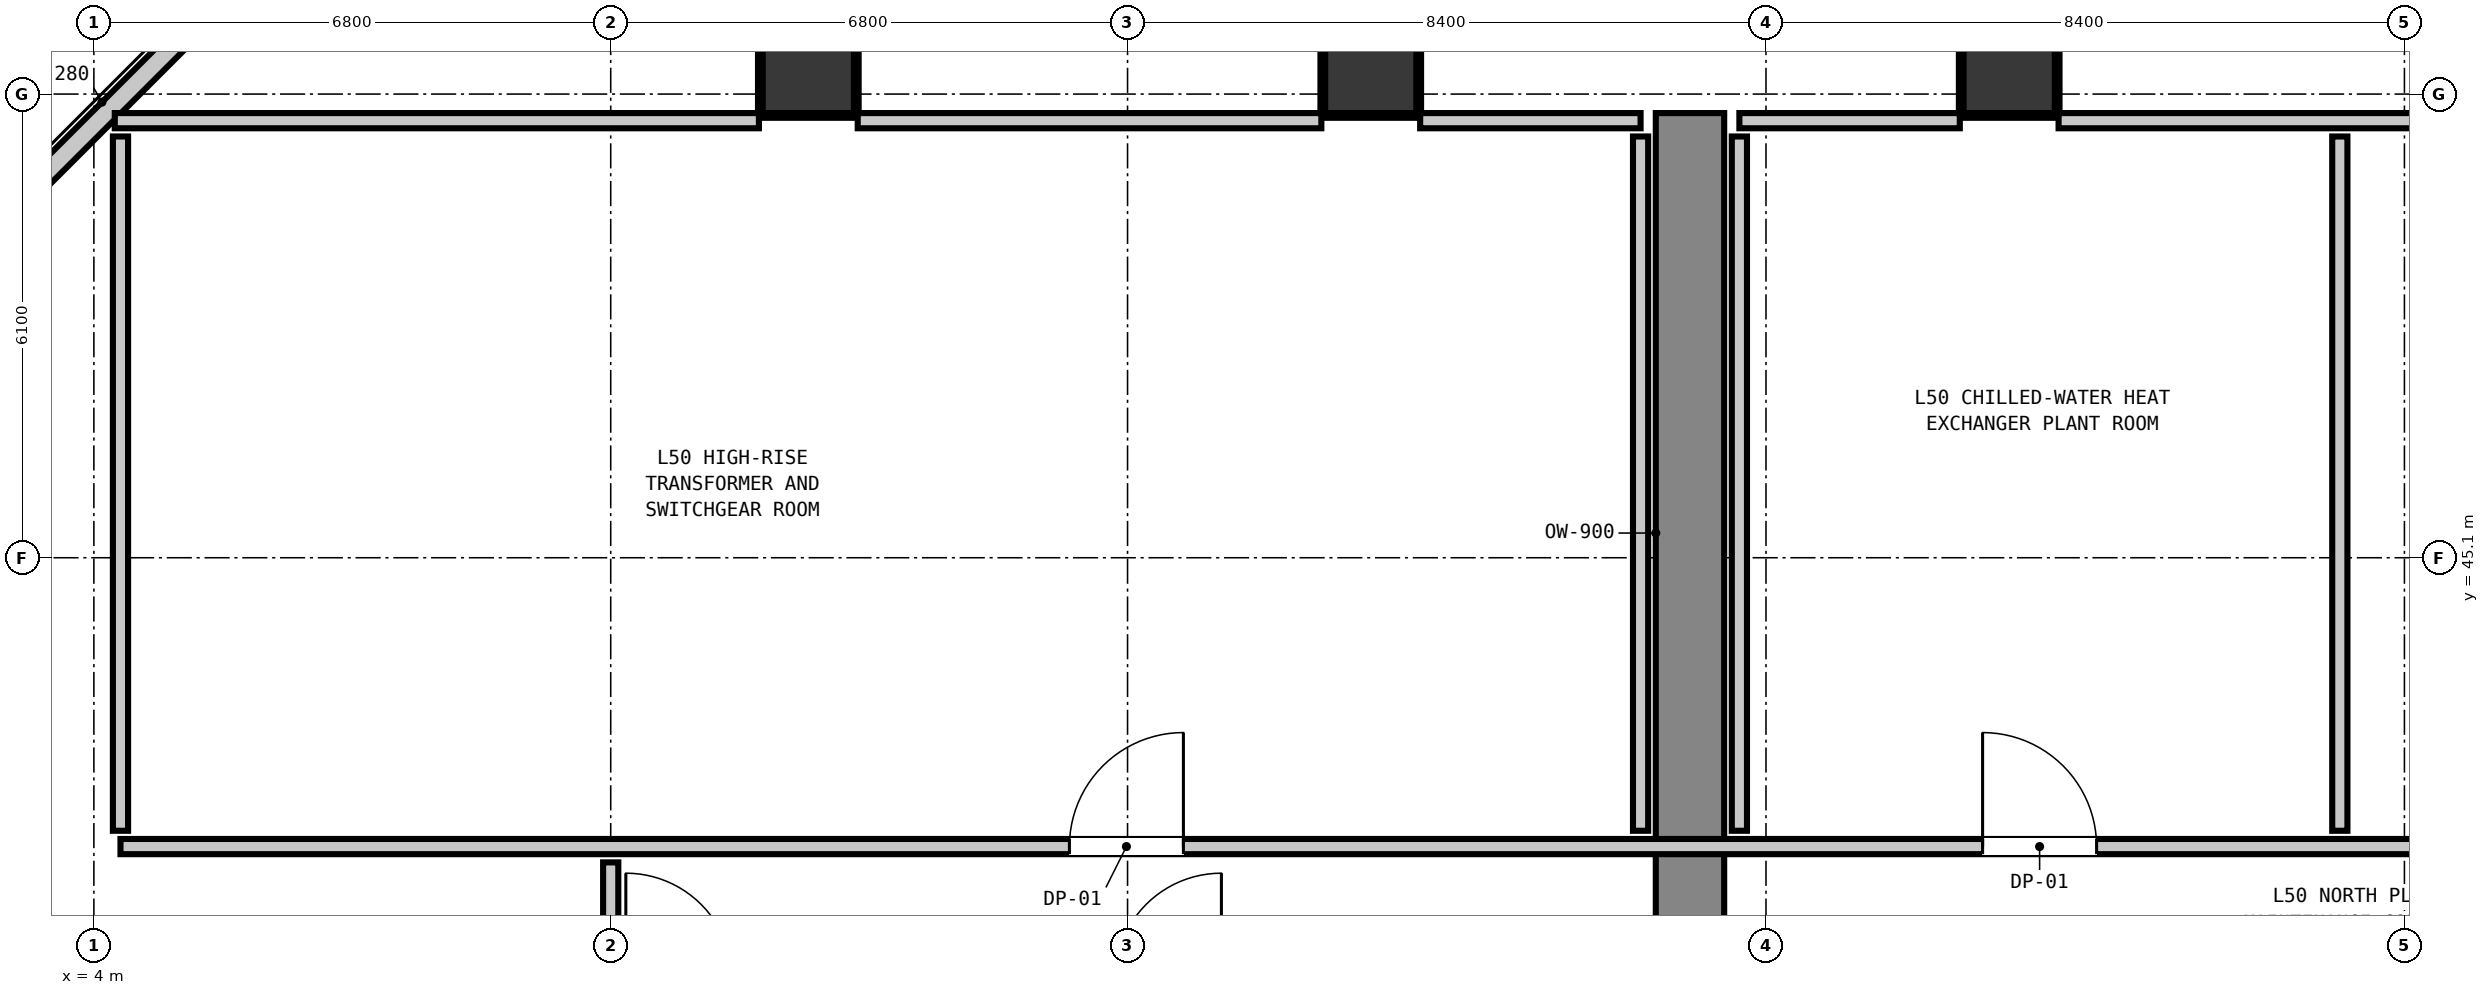
"""IFC4 building model, lengths in metres.
Left out: names, types, materials, properties, quantities, classifications, styles, units other than length and angle.
Written with IfcOpenShell. Run it as: python <this file> out.ifc"""

import sys

from ifc_helpers import new_model, si_unit, direction, frame, frame_2d, origin, origin_2d, place, context, subcontext, project, spatial, rectangle, extrude, element, fill, save


model = new_model("IFC4")
c1 = context("Model", 3, precision=1e-05, world=origin(), true_north=direction((0.0, 1.0)))
c2 = subcontext(c1, "Body", "Model", "MODEL_VIEW")
j1 = project(units=[si_unit("LENGTHUNIT", "METRE"), si_unit("PLANEANGLEUNIT", "RADIAN")], contexts=[c1])
p1 = place(None, origin())
s1 = spatial("IfcSite", under=j1, at=p1, CompositionType="ELEMENT")
p2 = place(p1, origin())
s2 = spatial("IfcBuilding", under=s1, at=p2, CompositionType="ELEMENT")
p3 = place(p2, frame((0.0, 0.0, 172.48)))
s3 = spatial("IfcBuildingStorey", under=s2, at=p3, CompositionType="ELEMENT", Elevation=172.48)
for number, where, z_axis, x_axis in (
    (1, (13.4, 51.55, 0.0), (0.0, 0.0, 1.0), (1.0, 0.0, 0.0)),
    (2, (20.8, 51.55, 0.0), (0.0, 0.0, 1.0), (1.0, 0.0, 0.0)),
    (3, (29.2, 51.55, 0.0), (0.0, 0.0, 1.0), (1.0, 0.0, 0.0)),
):
    element("IfcColumn", number, at=place(p3, frame(where, z_axis=z_axis, x_axis=x_axis)), inside=s3, PredefinedType="COLUMN", context=c2, shape_type="SweptSolid", body=[
        extrude(rectangle(XDim=1.2, YDim=1.2, at=origin_2d()), origin(), (0.0, 0.0, 1.0), 4.4),
    ])
p4 = place(p3, frame((25.0, 39.9, 0.0), z_axis=(0.0, 0.0, 1.0), x_axis=(0.0, 1.0, 0.0)))
e4 = element("IfcWall", 4, at=p4, inside=s3, PredefinedType="SHEAR", context=c2, shape_type="SweptSolid", body=[
    extrude(rectangle(XDim=11.05, YDim=0.9, at=frame_2d((5.525, 0.0))), origin(), (0.0, 0.0, 1.0), 4.16),
])
p5 = place(p3, frame((3.055, 49.845, 0.0), z_axis=(0.0, 0.0, 1.0), x_axis=(0.707106781187, 0.707106781187, 0.0)))
e5 = element("IfcWall", 5, at=p5, inside=s3, PredefinedType="STANDARD", context=c2, shape_type="SweptSolid", body=[
    extrude(rectangle(XDim=3.253, YDim=0.28, at=frame_2d((1.626, 0.0))), origin(), (0.0, 0.0, 1.0), 4.16),
])
p6 = place(p3, frame((4.35, 41.3, 0.0), z_axis=(0.0, 0.0, 1.0), x_axis=(1.0, 0.0, 0.0)))
e6 = element("IfcWall", 6, at=p6, inside=s3, PredefinedType="PARTITIONING", context=c2, shape_type="SweptSolid", body=[
    extrude(rectangle(XDim=37.1, YDim=0.2, at=frame_2d((18.55, 0.0))), origin(), (0.0, 0.0, 1.0), 4.16),
])
p7 = place(p6, frame((24.5, 0.0, 0.0)))
e7 = element("IfcOpeningElement", 7, at=p7, cuts=e6, PredefinedType="OPENING", context=c2, shape_type="SweptSolid", body=[
    extrude(rectangle(XDim=1.5, YDim=2.15, at=frame_2d((0.75, 1.075))), frame((0.0, 0.11, 0.0), z_axis=(0.0, -1.0, 0.0), x_axis=(1.0, 0.0, 0.0)), (0.0, 0.0, 1.0), 0.22),
])
p8 = place(p6, frame((31.215, 0.0, 0.0)))
e8 = element("IfcOpeningElement", 8, at=p8, cuts=e6, PredefinedType="OPENING", context=c2, shape_type="SweptSolid", body=[
    extrude(rectangle(XDim=1.5, YDim=2.15, at=frame_2d((0.75, 1.075))), frame((0.0, 0.11, 0.0), z_axis=(0.0, -1.0, 0.0), x_axis=(1.0, 0.0, 0.0)), (0.0, 0.0, 1.0), 0.22),
])
p9 = place(p6, frame((12.485, 0.0, 0.0)))
e9 = element("IfcOpeningElement", 9, at=p9, cuts=e6, PredefinedType="OPENING", context=c2, shape_type="SweptSolid", body=[
    extrude(rectangle(XDim=1.5, YDim=2.15, at=frame_2d((0.75, 1.075))), frame((0.0, 0.11, 0.0), z_axis=(0.0, -1.0, 0.0), x_axis=(1.0, 0.0, 0.0)), (0.0, 0.0, 1.0), 0.22),
])
p10 = place(p3, frame((4.275, 50.85, 0.0), z_axis=(0.0, 0.0, 1.0), x_axis=(1.0, 0.0, 0.0)))
e10 = element("IfcWall", 10, at=p10, inside=s3, PredefinedType="PARTITIONING", context=c2, shape_type="SweptSolid", body=[
    extrude(rectangle(XDim=8.475, YDim=0.2, at=frame_2d((4.238, 0.0))), origin(), (0.0, 0.0, 1.0), 4.16),
])
p11 = place(p3, frame((14.05, 50.85, 0.0), z_axis=(0.0, 0.0, 1.0), x_axis=(1.0, 0.0, 0.0)))
e11 = element("IfcWall", 11, at=p11, inside=s3, PredefinedType="PARTITIONING", context=c2, shape_type="SweptSolid", body=[
    extrude(rectangle(XDim=6.1, YDim=0.2, at=frame_2d((3.05, 0.0))), origin(), (0.0, 0.0, 1.0), 4.16),
])
for number, where, z_axis, x_axis in (
    (12, (21.45, 50.85, 0.0), (0.0, 0.0, 1.0), (1.0, 0.0, 0.0)),
    (13, (25.65, 50.85, 0.0), (0.0, 0.0, 1.0), (1.0, 0.0, 0.0)),
):
    element("IfcWall", number, at=place(p3, frame(where, z_axis=z_axis, x_axis=x_axis)), inside=s3, PredefinedType="PARTITIONING", context=c2, shape_type="SweptSolid", body=[
        extrude(rectangle(XDim=2.9, YDim=0.2, at=frame_2d((1.45, 0.0))), origin(), (0.0, 0.0, 1.0), 4.16),
    ])
p12 = place(p3, frame((29.85, 50.85, 0.0), z_axis=(0.0, 0.0, 1.0), x_axis=(1.0, 0.0, 0.0)))
e14 = element("IfcWall", 14, at=p12, inside=s3, PredefinedType="PARTITIONING", context=c2, shape_type="SweptSolid", body=[
    extrude(rectangle(XDim=6.0, YDim=0.2, at=frame_2d((3.0, 0.0))), origin(), (0.0, 0.0, 1.0), 4.16),
])
p13 = place(p3, frame((4.35, 41.508, 0.0), z_axis=(0.0, 0.0, 1.0), x_axis=(0.0, 1.0, 0.0)))
e15 = element("IfcWall", 15, at=p13, inside=s3, PredefinedType="PARTITIONING", context=c2, shape_type="SweptSolid", body=[
    extrude(rectangle(XDim=9.134, YDim=0.2, at=frame_2d((4.567, 0.0))), origin(), (0.0, 0.0, 1.0), 4.16),
])
p14 = place(p3, frame((10.8, 39.748, 0.0), z_axis=(0.0, 0.0, 1.0), x_axis=(0.0, 1.0, 0.0)))
e16 = element("IfcWall", 16, at=p14, inside=s3, PredefinedType="PARTITIONING", context=c2, shape_type="SweptSolid", body=[
    extrude(rectangle(XDim=1.344, YDim=0.2, at=frame_2d((0.672, 0.0))), origin(), (0.0, 0.0, 1.0), 4.16),
])
for number, where, z_axis, x_axis in (
    (17, (24.35, 41.508, 0.0), (0.0, 0.0, 1.0), (0.0, 1.0, 0.0)),
    (18, (25.65, 41.508, 0.0), (0.0, 0.0, 1.0), (0.0, 1.0, 0.0)),
    (19, (33.55, 41.508, 0.0), (0.0, 0.0, 1.0), (0.0, 1.0, 0.0)),
):
    element("IfcWall", number, at=place(p3, frame(where, z_axis=z_axis, x_axis=x_axis)), inside=s3, PredefinedType="PARTITIONING", context=c2, shape_type="SweptSolid", body=[
        extrude(rectangle(XDim=9.134, YDim=0.2, at=frame_2d((4.567, 0.0))), origin(), (0.0, 0.0, 1.0), 4.16),
    ])
p15 = place(p3, frame((12.8, 50.918, 0.0), z_axis=(0.0, 0.0, 1.0), x_axis=(1.0, 0.0, 0.0)))
e20 = element("IfcWall", 20, at=p15, inside=s3, PredefinedType="PARTITIONING", context=c2, shape_type="SweptSolid", body=[
    extrude(rectangle(XDim=1.2, YDim=0.06, at=frame_2d((0.6, 0.0))), origin(), (0.0, 0.0, 1.0), 1.45),
])
for number, where, z_axis, x_axis in (
    (21, (12.768, 50.95, 0.0), (0.0, 0.0, 1.0), (0.0, 1.0, 0.0)),
    (22, (14.032, 50.95, 0.0), (0.0, 0.0, 1.0), (0.0, 1.0, 0.0)),
):
    element("IfcWall", number, at=place(p3, frame(where, z_axis=z_axis, x_axis=x_axis)), inside=s3, PredefinedType="PARTITIONING", context=c2, shape_type="SweptSolid", body=[
        extrude(rectangle(XDim=1.04, YDim=0.06, at=frame_2d((0.52, 0.0))), origin(), (0.0, 0.0, 1.0), 1.45),
    ])
p16 = place(p3, frame((20.2, 50.918, 0.0), z_axis=(0.0, 0.0, 1.0), x_axis=(1.0, 0.0, 0.0)))
e23 = element("IfcWall", 23, at=p16, inside=s3, PredefinedType="PARTITIONING", context=c2, shape_type="SweptSolid", body=[
    extrude(rectangle(XDim=1.2, YDim=0.06, at=frame_2d((0.6, 0.0))), origin(), (0.0, 0.0, 1.0), 1.45),
])
for number, where, z_axis, x_axis in (
    (24, (20.168, 50.95, 0.0), (0.0, 0.0, 1.0), (0.0, 1.0, 0.0)),
    (25, (21.432, 50.95, 0.0), (0.0, 0.0, 1.0), (0.0, 1.0, 0.0)),
):
    element("IfcWall", number, at=place(p3, frame(where, z_axis=z_axis, x_axis=x_axis)), inside=s3, PredefinedType="PARTITIONING", context=c2, shape_type="SweptSolid", body=[
        extrude(rectangle(XDim=1.04, YDim=0.06, at=frame_2d((0.52, 0.0))), origin(), (0.0, 0.0, 1.0), 1.45),
    ])
p17 = place(p3, frame((28.6, 50.918, 0.0), z_axis=(0.0, 0.0, 1.0), x_axis=(1.0, 0.0, 0.0)))
e26 = element("IfcWall", 26, at=p17, inside=s3, PredefinedType="PARTITIONING", context=c2, shape_type="SweptSolid", body=[
    extrude(rectangle(XDim=1.2, YDim=0.06, at=frame_2d((0.6, 0.0))), origin(), (0.0, 0.0, 1.0), 1.45),
])
for number, where, z_axis, x_axis in (
    (27, (28.568, 50.95, 0.0), (0.0, 0.0, 1.0), (0.0, 1.0, 0.0)),
    (28, (29.832, 50.95, 0.0), (0.0, 0.0, 1.0), (0.0, 1.0, 0.0)),
):
    element("IfcWall", number, at=place(p3, frame(where, z_axis=z_axis, x_axis=x_axis)), inside=s3, PredefinedType="PARTITIONING", context=c2, shape_type="SweptSolid", body=[
        extrude(rectangle(XDim=1.04, YDim=0.06, at=frame_2d((0.52, 0.0))), origin(), (0.0, 0.0, 1.0), 1.45),
    ])
p18 = place(p7, origin())
e29 = element("IfcDoor", 29, at=p18, inside=s3, OperationType="SINGLE_SWING_LEFT", PredefinedType="DOOR", context=c2, shape_type="SweptSolid", body=[
    extrude(rectangle(XDim=1.5, YDim=2.15, at=frame_2d((0.75, 1.075))), frame((0.0, 0.025, 0.0), z_axis=(0.0, -1.0, 0.0), x_axis=(1.0, 0.0, 0.0)), (0.0, 0.0, 1.0), 0.05),
])
fill(e7, e29)
p19 = place(p9, origin())
e30 = element("IfcDoor", 30, at=p19, inside=s3, OperationType="SINGLE_SWING_RIGHT", PredefinedType="DOOR", context=c2, shape_type="SweptSolid", body=[
    extrude(rectangle(XDim=1.5, YDim=2.15, at=frame_2d((0.75, 1.075))), frame((0.0, 0.025, 0.0), z_axis=(0.0, -1.0, 0.0), x_axis=(1.0, 0.0, 0.0)), (0.0, 0.0, 1.0), 0.05),
])
fill(e9, e30)
save(model, sys.argv[1])
